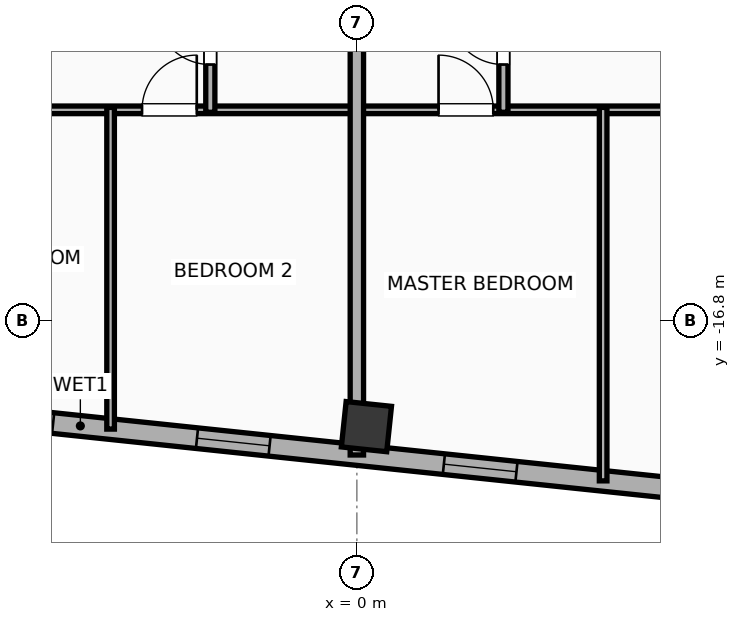
"""IFC4 building model, lengths in metres.
Left out: names, types, materials, properties, quantities, classifications, styles, units other than length and angle.
Written with IfcOpenShell. Run it as: python <this file> out.ifc"""

import sys

from ifc_helpers import new_model, si_unit, direction, frame, frame_2d, origin, origin_2d, place, context, subcontext, project, spatial, rectangle, hollow_rectangle, extrude, element, fill, save


model = new_model("IFC4")
c1 = context("Model", 3, precision=1e-05, world=origin(), true_north=direction((0.0, 1.0)))
c2 = subcontext(c1, "Body", "Model", "MODEL_VIEW")
j1 = project(units=[si_unit("LENGTHUNIT", "METRE"), si_unit("PLANEANGLEUNIT", "RADIAN")], contexts=[c1])
p1 = place(None, origin())
s1 = spatial("IfcSite", under=j1, at=p1, CompositionType="ELEMENT")
p2 = place(p1, origin())
s2 = spatial("IfcBuilding", under=s1, at=p2, CompositionType="ELEMENT")
p3 = place(p2, frame((0.0, 0.0, 260.0)))
s3 = spatial("IfcBuildingStorey", under=s2, at=p3, CompositionType="ELEMENT", Elevation=260.0)
p4 = place(p3, frame((0.157, -18.54, 0.0), z_axis=(0.0, 0.0, 1.0), x_axis=(0.994521895368, -0.104528463268, 0.0)))
e1 = element("IfcColumn", 1, at=p4, inside=s3, PredefinedType="COLUMN", context=c2, shape_type="SweptSolid", body=[
    extrude(hollow_rectangle(XDim=0.75, YDim=0.75, WallThickness=0.025, at=origin_2d()), origin(), (0.0, 0.0, 1.0), 3.9),
])
p5 = place(p3, frame((18.708, -20.972, 0.0), z_axis=(0.0, 0.0, 1.0), x_axis=(-0.994521888554, 0.104528528102, 0.0)))
e2 = element("IfcWall", 2, at=p5, inside=s3, PredefinedType="ELEMENTEDWALL", context=c2, shape_type="SweptSolid", body=[
    extrude(rectangle(XDim=46.766, YDim=0.34, at=frame_2d((23.383, 0.0))), origin(), (0.0, 0.0, 1.0), 2.54),
])
p6 = place(p5, frame((23.833, 0.0, 0.75)))
e3 = element("IfcOpeningElement", 3, at=p6, cuts=e2, PredefinedType="OPENING", context=c2, shape_type="SweptSolid", body=[
    extrude(rectangle(XDim=2.4, YDim=1.63, at=frame_2d((1.2, 0.815))), frame((0.0, 0.18, 0.0), z_axis=(0.0, -1.0, 0.0), x_axis=(1.0, 0.0, 0.0)), (0.0, 0.0, 1.0), 0.36),
])
p7 = place(p5, frame((38.622, 0.0, 0.75)))
e4 = element("IfcOpeningElement", 4, at=p7, cuts=e2, PredefinedType="OPENING", context=c2, shape_type="SweptSolid", body=[
    extrude(rectangle(XDim=2.4, YDim=1.63, at=frame_2d((1.2, 0.815))), frame((0.0, 0.18, 0.0), z_axis=(0.0, -1.0, 0.0), x_axis=(1.0, 0.0, 0.0)), (0.0, 0.0, 1.0), 0.36),
])
p8 = place(p5, frame((44.402, 0.0, 0.75)))
e5 = element("IfcOpeningElement", 5, at=p8, cuts=e2, PredefinedType="OPENING", context=c2, shape_type="SweptSolid", body=[
    extrude(rectangle(XDim=1.2, YDim=1.63, at=frame_2d((0.6, 0.815))), frame((0.0, 0.18, 0.0), z_axis=(0.0, -1.0, 0.0), x_axis=(1.0, 0.0, 0.0)), (0.0, 0.0, 1.0), 0.36),
])
p9 = place(p5, frame((42.406, 0.0, 0.75)))
e6 = element("IfcOpeningElement", 6, at=p9, cuts=e2, PredefinedType="OPENING", context=c2, shape_type="SweptSolid", body=[
    extrude(rectangle(XDim=1.2, YDim=1.63, at=frame_2d((0.6, 0.815))), frame((0.0, 0.18, 0.0), z_axis=(0.0, -1.0, 0.0), x_axis=(1.0, 0.0, 0.0)), (0.0, 0.0, 1.0), 0.36),
])
p10 = place(p5, frame((34.933, 0.0, 0.75)))
e7 = element("IfcOpeningElement", 7, at=p10, cuts=e2, PredefinedType="OPENING", context=c2, shape_type="SweptSolid", body=[
    extrude(rectangle(XDim=1.2, YDim=1.63, at=frame_2d((0.6, 0.815))), frame((0.0, 0.18, 0.0), z_axis=(0.0, -1.0, 0.0), x_axis=(1.0, 0.0, 0.0)), (0.0, 0.0, 1.0), 0.36),
])
p11 = place(p5, frame((28.631, 0.0, 0.75)))
e8 = element("IfcOpeningElement", 8, at=p11, cuts=e2, PredefinedType="OPENING", context=c2, shape_type="SweptSolid", body=[
    extrude(rectangle(XDim=1.2, YDim=1.63, at=frame_2d((0.6, 0.815))), frame((0.0, 0.18, 0.0), z_axis=(0.0, -1.0, 0.0), x_axis=(1.0, 0.0, 0.0)), (0.0, 0.0, 1.0), 0.36),
])
p12 = place(p5, frame((30.896, 0.0, 0.75)))
e9 = element("IfcOpeningElement", 9, at=p12, cuts=e2, PredefinedType="OPENING", context=c2, shape_type="SweptSolid", body=[
    extrude(rectangle(XDim=1.2, YDim=1.63, at=frame_2d((0.6, 0.815))), frame((0.0, 0.18, 0.0), z_axis=(0.0, -1.0, 0.0), x_axis=(1.0, 0.0, 0.0)), (0.0, 0.0, 1.0), 0.36),
])
p13 = place(p5, frame((7.492, 0.0, 0.75)))
e10 = element("IfcOpeningElement", 10, at=p13, cuts=e2, PredefinedType="OPENING", context=c2, shape_type="SweptSolid", body=[
    extrude(rectangle(XDim=1.2, YDim=1.63, at=frame_2d((0.6, 0.815))), frame((0.0, 0.18, 0.0), z_axis=(0.0, -1.0, 0.0), x_axis=(1.0, 0.0, 0.0)), (0.0, 0.0, 1.0), 0.36),
])
p14 = place(p5, frame((4.141, 0.0, 0.75)))
e11 = element("IfcOpeningElement", 11, at=p14, cuts=e2, PredefinedType="OPENING", context=c2, shape_type="SweptSolid", body=[
    extrude(rectangle(XDim=1.2, YDim=1.63, at=frame_2d((0.6, 0.815))), frame((0.0, 0.18, 0.0), z_axis=(0.0, -1.0, 0.0), x_axis=(1.0, 0.0, 0.0)), (0.0, 0.0, 1.0), 0.36),
])
p15 = place(p5, frame((1.36, 0.0, 0.75)))
e12 = element("IfcOpeningElement", 12, at=p15, cuts=e2, PredefinedType="OPENING", context=c2, shape_type="SweptSolid", body=[
    extrude(rectangle(XDim=1.2, YDim=1.63, at=frame_2d((0.6, 0.815))), frame((0.0, 0.18, 0.0), z_axis=(0.0, -1.0, 0.0), x_axis=(1.0, 0.0, 0.0)), (0.0, 0.0, 1.0), 0.36),
])
p16 = place(p5, frame((20.254, 0.0, 0.75)))
e13 = element("IfcOpeningElement", 13, at=p16, cuts=e2, PredefinedType="OPENING", context=c2, shape_type="SweptSolid", body=[
    extrude(rectangle(XDim=1.2, YDim=1.63, at=frame_2d((0.6, 0.815))), frame((0.0, 0.18, 0.0), z_axis=(0.0, -1.0, 0.0), x_axis=(1.0, 0.0, 0.0)), (0.0, 0.0, 1.0), 0.36),
])
p17 = place(p5, frame((16.172, 0.0, 0.75)))
e14 = element("IfcOpeningElement", 14, at=p17, cuts=e2, PredefinedType="OPENING", context=c2, shape_type="SweptSolid", body=[
    extrude(rectangle(XDim=1.2, YDim=1.63, at=frame_2d((0.6, 0.815))), frame((0.0, 0.18, 0.0), z_axis=(0.0, -1.0, 0.0), x_axis=(1.0, 0.0, 0.0)), (0.0, 0.0, 1.0), 0.36),
])
p18 = place(p5, frame((12.11, 0.0, 0.75)))
e15 = element("IfcOpeningElement", 15, at=p18, cuts=e2, PredefinedType="OPENING", context=c2, shape_type="SweptSolid", body=[
    extrude(rectangle(XDim=1.2, YDim=1.63, at=frame_2d((0.6, 0.815))), frame((0.0, 0.18, 0.0), z_axis=(0.0, -1.0, 0.0), x_axis=(1.0, 0.0, 0.0)), (0.0, 0.0, 1.0), 0.36),
])
p19 = place(p3, frame((-8.08, -13.33, 0.0), z_axis=(0.0, 0.0, 1.0), x_axis=(1.0, 0.0, 0.0)))
e16 = element("IfcWall", 16, at=p19, inside=s3, PredefinedType="PARTITIONING", context=c2, shape_type="SweptSolid", body=[
    extrude(rectangle(XDim=8.06, YDim=0.125, at=frame_2d((4.03, 0.0))), origin(), (0.0, 0.0, 1.0), 3.65),
])
p20 = place(p19, frame((1.323, 0.0, 0.0)))
e17 = element("IfcOpeningElement", 17, at=p20, cuts=e16, PredefinedType="OPENING", context=c2, shape_type="SweptSolid", body=[
    extrude(rectangle(XDim=0.9, YDim=2.05, at=frame_2d((0.45, 1.025))), frame((0.0, 0.073, 0.0), z_axis=(0.0, -1.0, 0.0), x_axis=(1.0, 0.0, 0.0)), (0.0, 0.0, 1.0), 0.145),
])
p21 = place(p19, frame((4.547, 0.0, 0.0)))
e18 = element("IfcOpeningElement", 18, at=p21, cuts=e16, PredefinedType="OPENING", context=c2, shape_type="SweptSolid", body=[
    extrude(rectangle(XDim=0.9, YDim=2.05, at=frame_2d((0.45, 1.025))), frame((0.0, 0.073, 0.0), z_axis=(0.0, -1.0, 0.0), x_axis=(1.0, 0.0, 0.0)), (0.0, 0.0, 1.0), 0.145),
])
p22 = place(p3, frame((-2.41, -13.37, 0.0), z_axis=(0.0, 0.0, 1.0), x_axis=(0.0, 1.0, 0.0)))
e19 = element("IfcWall", 19, at=p22, inside=s3, PredefinedType="PLUMBINGWALL", context=c2, shape_type="SweptSolid", body=[
    extrude(rectangle(XDim=2.47, YDim=0.15, at=frame_2d((1.235, 0.0))), origin(), (0.0, 0.0, 1.0), 3.65),
])
p23 = place(p22, frame((0.785, 0.0, 0.0)))
e20 = element("IfcOpeningElement", 20, at=p23, cuts=e19, PredefinedType="OPENING", context=c2, shape_type="SweptSolid", body=[
    extrude(rectangle(XDim=0.9, YDim=2.05, at=frame_2d((0.45, 1.025))), frame((0.0, 0.085, 0.0), z_axis=(0.0, -1.0, 0.0), x_axis=(1.0, 0.0, 0.0)), (0.0, 0.0, 1.0), 0.17),
])
p24 = place(p3, frame((-4.05, -18.58, 0.0), z_axis=(0.0, 0.0, 1.0), x_axis=(0.0, 1.0, 0.0)))
e21 = element("IfcWall", 21, at=p24, inside=s3, PredefinedType="PARTITIONING", context=c2, shape_type="SweptSolid", body=[
    extrude(rectangle(XDim=5.29, YDim=0.125, at=frame_2d((2.645, 0.0))), origin(), (0.0, 0.0, 1.0), 3.65),
])
p25 = place(p3, frame((0.02, -13.33, 0.0), z_axis=(0.0, 0.0, 1.0), x_axis=(1.0, 0.0, 0.0)))
e22 = element("IfcWall", 22, at=p25, inside=s3, PredefinedType="PARTITIONING", context=c2, shape_type="SweptSolid", body=[
    extrude(rectangle(XDim=7.992, YDim=0.125, at=frame_2d((3.996, 0.0))), origin(), (0.0, 0.0, 1.0), 3.65),
])
p26 = place(p25, frame((1.323, 0.0, 0.0)))
e23 = element("IfcOpeningElement", 23, at=p26, cuts=e22, PredefinedType="OPENING", context=c2, shape_type="SweptSolid", body=[
    extrude(rectangle(XDim=0.9, YDim=2.05, at=frame_2d((0.45, 1.025))), frame((0.0, 0.073, 0.0), z_axis=(0.0, -1.0, 0.0), x_axis=(1.0, 0.0, 0.0)), (0.0, 0.0, 1.0), 0.145),
])
p27 = place(p25, frame((5.837, 0.0, 0.0)))
e24 = element("IfcOpeningElement", 24, at=p27, cuts=e22, PredefinedType="OPENING", context=c2, shape_type="SweptSolid", body=[
    extrude(rectangle(XDim=0.9, YDim=2.05, at=frame_2d((0.45, 1.025))), frame((0.0, 0.073, 0.0), z_axis=(0.0, -1.0, 0.0), x_axis=(1.0, 0.0, 0.0)), (0.0, 0.0, 1.0), 0.145),
])
p28 = place(p3, frame((2.41, -13.37, 0.0), z_axis=(0.0, 0.0, 1.0), x_axis=(0.0, 1.0, 0.0)))
e25 = element("IfcWall", 25, at=p28, inside=s3, PredefinedType="PLUMBINGWALL", context=c2, shape_type="SweptSolid", body=[
    extrude(rectangle(XDim=2.47, YDim=0.15, at=frame_2d((1.235, 0.0))), origin(), (0.0, 0.0, 1.0), 2.54),
])
p29 = place(p28, frame((0.785, 0.0, 0.0)))
e26 = element("IfcOpeningElement", 26, at=p29, cuts=e25, PredefinedType="OPENING", context=c2, shape_type="SweptSolid", body=[
    extrude(rectangle(XDim=0.9, YDim=2.05, at=frame_2d((0.45, 1.025))), frame((0.0, 0.085, 0.0), z_axis=(0.0, -1.0, 0.0), x_axis=(1.0, 0.0, 0.0)), (0.0, 0.0, 1.0), 0.17),
])
p30 = place(p3, frame((4.05, -19.432, 0.0), z_axis=(0.0, 0.0, 1.0), x_axis=(0.0, 1.0, 0.0)))
e27 = element("IfcWall", 27, at=p30, inside=s3, PredefinedType="PARTITIONING", context=c2, shape_type="SweptSolid", body=[
    extrude(rectangle(XDim=6.142, YDim=0.125, at=frame_2d((3.071, 0.0))), origin(), (0.0, 0.0, 1.0), 3.65),
])
p31 = place(p3, frame((0.0, -19.006, 0.0), z_axis=(0.0, 0.0, 1.0), x_axis=(0.0, 1.0, 0.0)))
e28 = element("IfcWall", 28, at=p31, inside=s3, PredefinedType="PARTITIONING", context=c2, shape_type="SweptSolid", body=[
    extrude(rectangle(XDim=10.516, YDim=0.22, at=frame_2d((5.258, 0.0))), origin(), (0.0, 0.0, 1.0), 2.54),
])
p32 = place(p6, origin())
e29 = element("IfcWindow", 29, at=p32, inside=s3, PartitioningType="SINGLE_PANEL", PredefinedType="WINDOW", context=c2, shape_type="SweptSolid", body=[
    extrude(rectangle(XDim=2.4, YDim=1.63, at=frame_2d((1.2, 0.815))), frame((0.0, 0.03, 0.0), z_axis=(0.0, -1.0, 0.0), x_axis=(1.0, 0.0, 0.0)), (0.0, 0.0, 1.0), 0.06),
])
fill(e3, e29)
p33 = place(p16, origin())
e30 = element("IfcWindow", 30, at=p33, inside=s3, PartitioningType="SINGLE_PANEL", PredefinedType="WINDOW", context=c2, shape_type="SweptSolid", body=[
    extrude(rectangle(XDim=1.2, YDim=1.63, at=frame_2d((0.6, 0.815))), frame((0.0, 0.03, 0.0), z_axis=(0.0, -1.0, 0.0), x_axis=(1.0, 0.0, 0.0)), (0.0, 0.0, 1.0), 0.06),
])
fill(e13, e30)
p34 = place(p17, origin())
e31 = element("IfcWindow", 31, at=p34, inside=s3, PartitioningType="SINGLE_PANEL", PredefinedType="WINDOW", context=c2, shape_type="SweptSolid", body=[
    extrude(rectangle(XDim=1.2, YDim=1.63, at=frame_2d((0.6, 0.815))), frame((0.0, 0.03, 0.0), z_axis=(0.0, -1.0, 0.0), x_axis=(1.0, 0.0, 0.0)), (0.0, 0.0, 1.0), 0.06),
])
fill(e14, e31)
p35 = place(p21, origin())
e32 = element("IfcDoor", 32, at=p35, inside=s3, OperationType="SINGLE_SWING_RIGHT", PredefinedType="DOOR", context=c2, shape_type="SweptSolid", body=[
    extrude(rectangle(XDim=0.9, YDim=2.05, at=frame_2d((0.45, 1.025))), frame((0.0, 0.025, 0.0), z_axis=(0.0, -1.0, 0.0), x_axis=(1.0, 0.0, 0.0)), (0.0, 0.0, 1.0), 0.05),
])
fill(e18, e32)
p36 = place(p23, origin())
e33 = element("IfcDoor", 33, at=p36, inside=s3, OperationType="SINGLE_SWING_RIGHT", PredefinedType="DOOR", context=c2, shape_type="SweptSolid", body=[
    extrude(rectangle(XDim=0.9, YDim=2.05, at=frame_2d((0.45, 1.025))), frame((0.0, 0.025, 0.0), z_axis=(0.0, -1.0, 0.0), x_axis=(1.0, 0.0, 0.0)), (0.0, 0.0, 1.0), 0.05),
])
fill(e20, e33)
p37 = place(p26, origin())
e34 = element("IfcDoor", 34, at=p37, inside=s3, OperationType="SINGLE_SWING_LEFT", PredefinedType="DOOR", context=c2, shape_type="SweptSolid", body=[
    extrude(rectangle(XDim=0.9, YDim=2.05, at=frame_2d((0.45, 1.025))), frame((0.0, 0.025, 0.0), z_axis=(0.0, -1.0, 0.0), x_axis=(1.0, 0.0, 0.0)), (0.0, 0.0, 1.0), 0.05),
])
fill(e23, e34)
p38 = place(p29, origin())
e35 = element("IfcDoor", 35, at=p38, inside=s3, OperationType="SINGLE_SWING_RIGHT", PredefinedType="DOOR", context=c2, shape_type="SweptSolid", body=[
    extrude(rectangle(XDim=0.9, YDim=2.05, at=frame_2d((0.45, 1.025))), frame((0.0, 0.025, 0.0), z_axis=(0.0, -1.0, 0.0), x_axis=(1.0, 0.0, 0.0)), (0.0, 0.0, 1.0), 0.05),
])
fill(e26, e35)
save(model, sys.argv[1])
